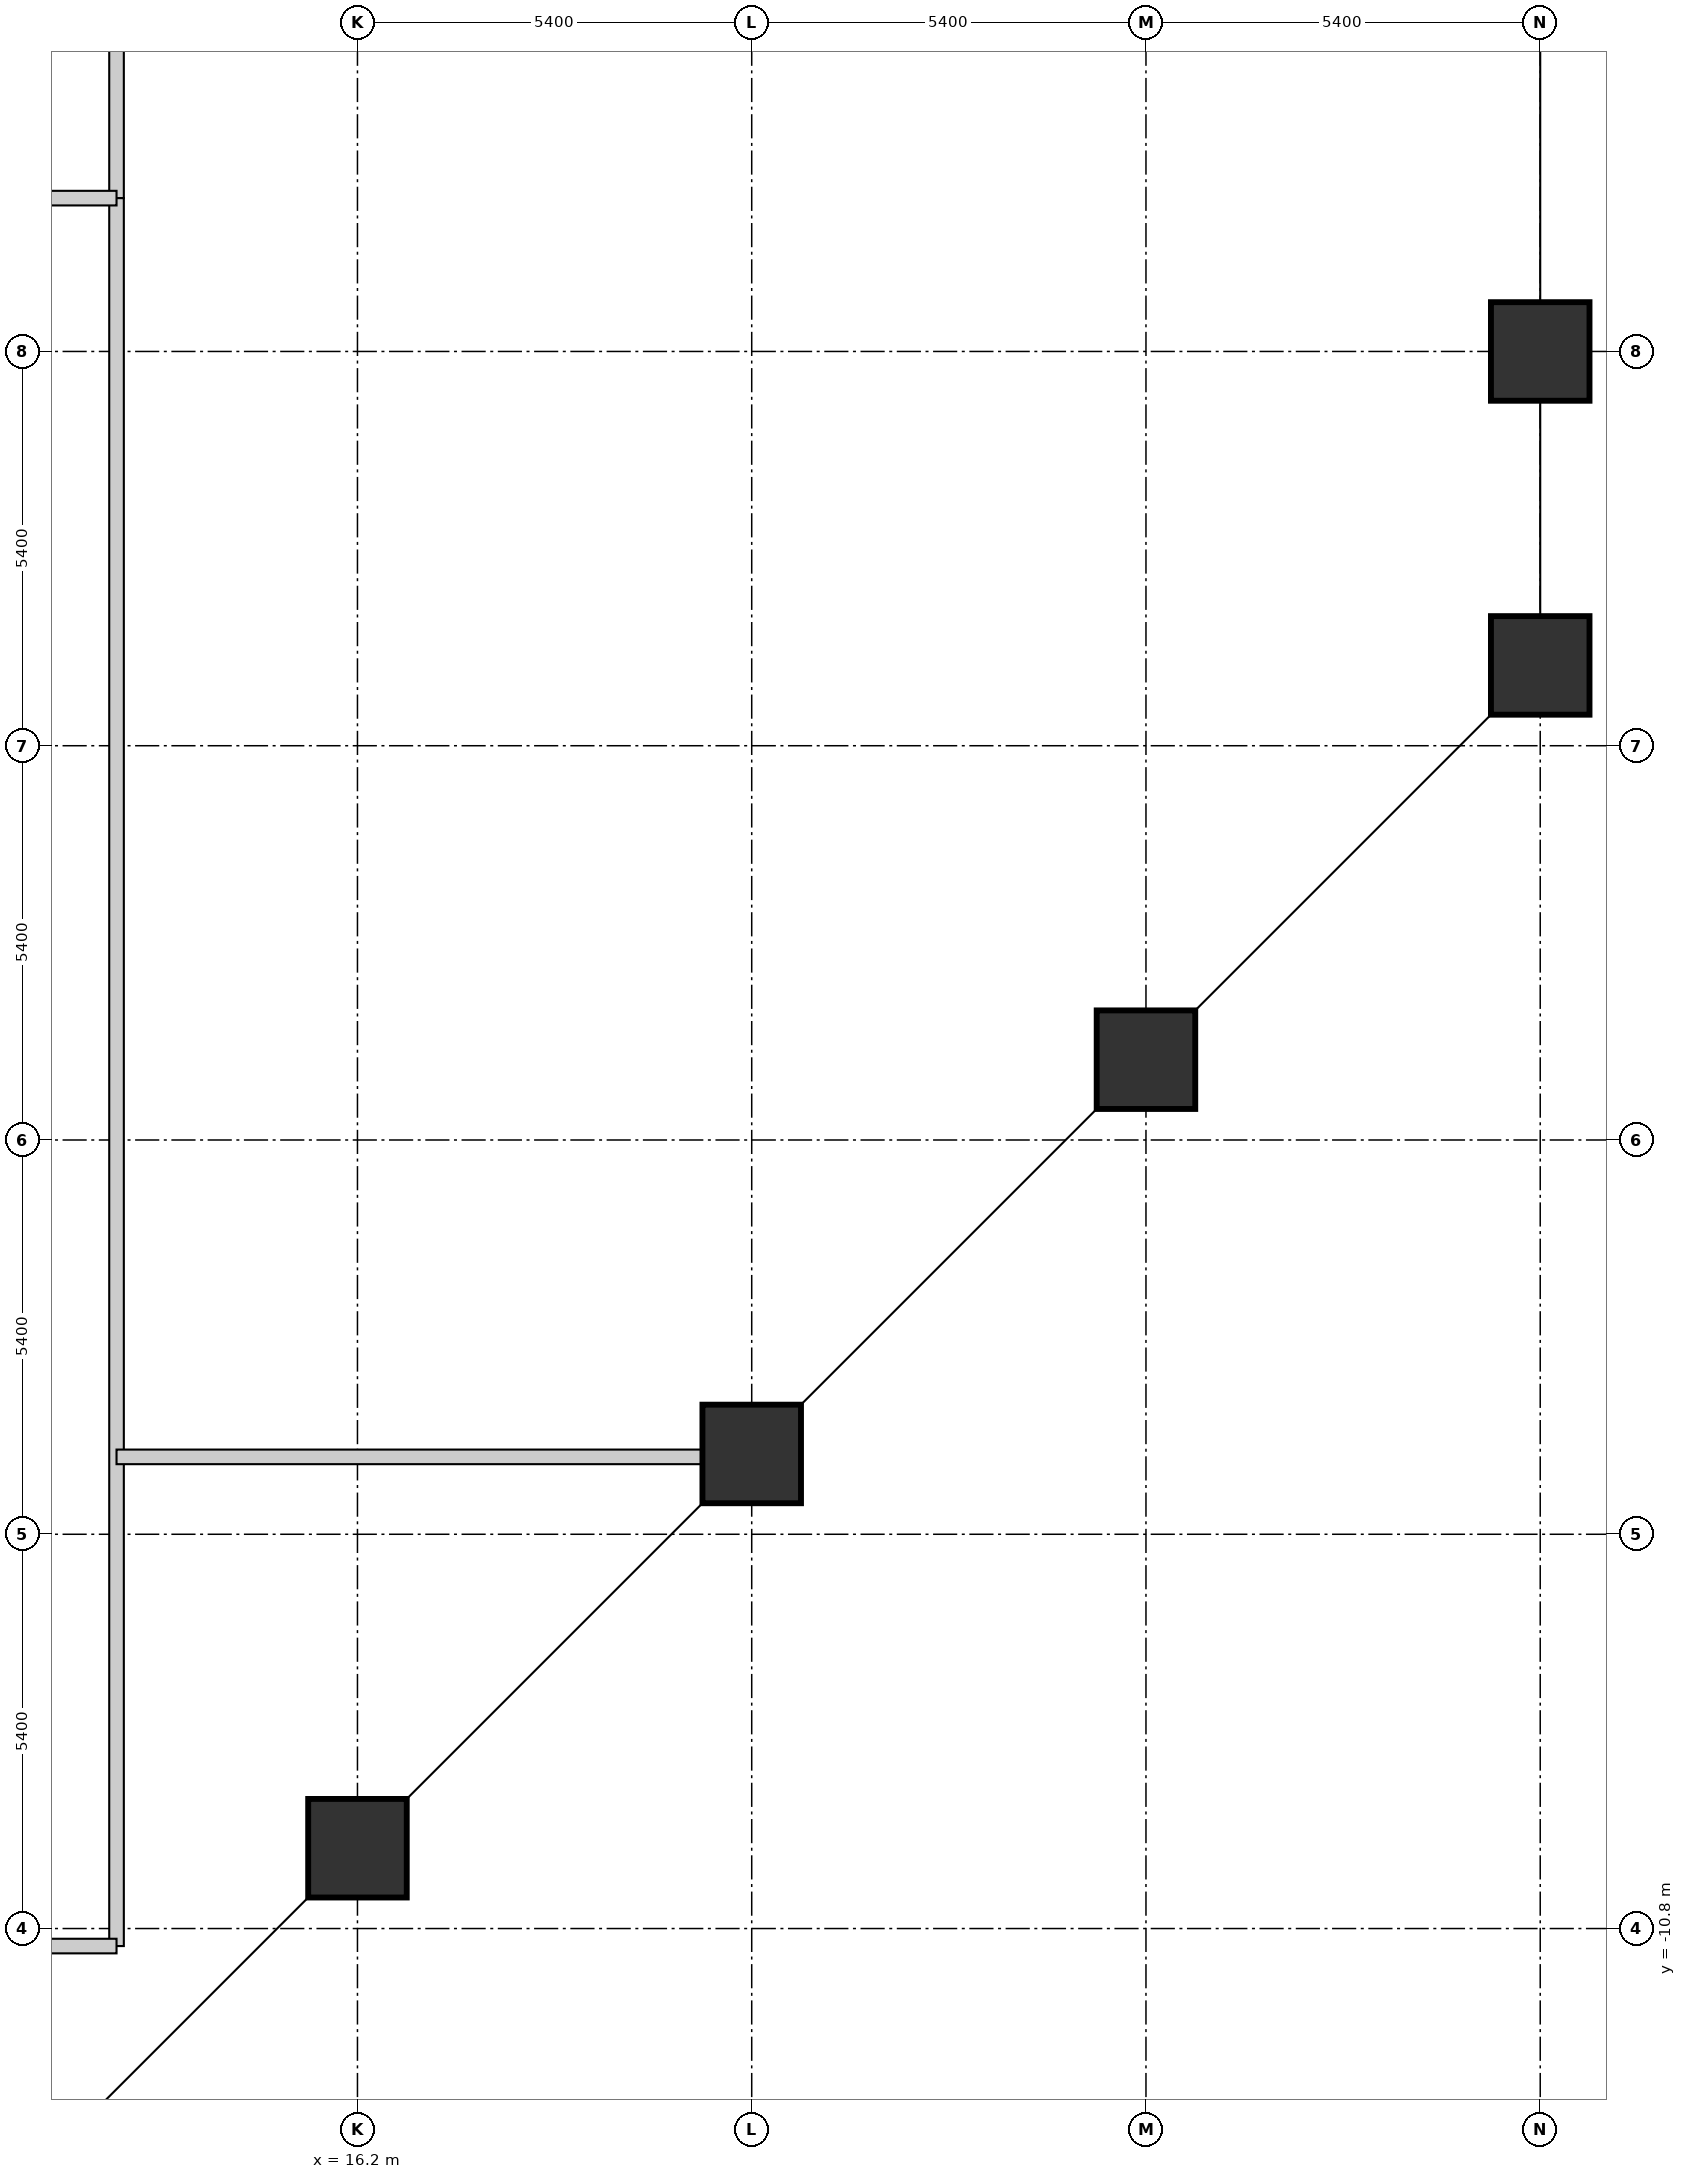
"""IFC4 building model, lengths in metres.
Left out: names, types, materials, properties, quantities, classifications, styles, units other than length and angle.
Written with IfcOpenShell. Run it as: python <this file> out.ifc"""

import sys

from ifc_helpers import new_model, si_unit, direction, frame, frame_2d, origin, origin_2d, place, context, subcontext, project, spatial, rectangle, extrude, element, fill, save


model = new_model("IFC4")
c1 = context("Model", 3, precision=1e-05, world=origin(), true_north=direction((0.0, 1.0)))
c2 = subcontext(c1, "Body", "Model", "MODEL_VIEW")
j1 = project(units=[si_unit("LENGTHUNIT", "METRE"), si_unit("PLANEANGLEUNIT", "RADIAN")], contexts=[c1])
p1 = place(None, origin())
s1 = spatial("IfcSite", under=j1, at=p1, CompositionType="ELEMENT")
p2 = place(p1, origin())
s2 = spatial("IfcBuilding", under=s1, at=p2, CompositionType="ELEMENT")
p3 = place(p2, frame((0.0, 0.0, 22.5)))
s3 = spatial("IfcBuildingStorey", under=s2, at=p3, CompositionType="ELEMENT", Elevation=22.5)
for number, where, z_axis, x_axis in (
    (1, (16.2, -9.7, 0.0), (0.0, 0.0, 1.0), (1.0, 0.0, 0.0)),
    (2, (21.6, -4.3, 0.0), (0.0, 0.0, 1.0), (1.0, 0.0, 0.0)),
    (3, (27.0, 1.1, 0.0), (0.0, 0.0, 1.0), (1.0, 0.0, 0.0)),
    (4, (32.4, 6.5, 0.0), (0.0, 0.0, 1.0), (1.0, 0.0, 0.0)),
    (5, (32.4, 10.8, 0.0), (0.0, 0.0, 1.0), (1.0, 0.0, 0.0)),
):
    element("IfcColumn", number, at=place(p3, frame(where, z_axis=z_axis, x_axis=x_axis)), inside=s3, PredefinedType="COLUMN", context=c2, shape_type="SweptSolid", body=[
        extrude(rectangle(XDim=1.35, YDim=1.35, at=origin_2d()), origin(), (0.0, 0.0, 1.0), 3.75),
    ])
p4 = place(p3, frame((12.9, 12.9, 0.0), z_axis=(0.0, 0.0, 1.0), x_axis=(0.0, 1.0, 0.0)))
e6 = element("IfcWall", 6, at=p4, inside=s3, PredefinedType="PARTITIONING", context=c2, shape_type="SweptSolid", body=[
    extrude(rectangle(XDim=12.94, YDim=0.2, at=frame_2d((6.47, 0.0))), origin(), (0.0, 0.0, 1.0), 2.629),
])
p5 = place(p3, frame((12.9, -11.04, 0.0), z_axis=(0.0, 0.0, 1.0), x_axis=(0.0, 1.0, 0.0)))
e7 = element("IfcWall", 7, at=p5, inside=s3, PredefinedType="PARTITIONING", context=c2, shape_type="SweptSolid", body=[
    extrude(rectangle(XDim=23.94, YDim=0.2, at=frame_2d((11.97, 0.0))), origin(), (0.0, 0.0, 1.0), 3.57),
])
p6 = place(p5, frame((2.9, 0.0, 0.0)))
e8 = element("IfcOpeningElement", 8, at=p6, cuts=e7, PredefinedType="OPENING", context=c2, shape_type="SweptSolid", body=[
    extrude(rectangle(XDim=0.85, YDim=2.1, at=frame_2d((0.425, 1.05))), frame((0.0, 0.11, 0.0), z_axis=(0.0, -1.0, 0.0), x_axis=(1.0, 0.0, 0.0)), (0.0, 0.0, 1.0), 0.22),
])
p7 = place(p5, frame((14.87, 0.0, 0.0)))
e9 = element("IfcOpeningElement", 9, at=p7, cuts=e7, PredefinedType="OPENING", context=c2, shape_type="SweptSolid", body=[
    extrude(rectangle(XDim=0.95, YDim=2.1, at=frame_2d((0.475, 1.05))), frame((0.0, 0.11, 0.0), z_axis=(0.0, -1.0, 0.0), x_axis=(1.0, 0.0, 0.0)), (0.0, 0.0, 1.0), 0.22),
])
p8 = place(p3, frame((10.85, -11.04, 0.0), z_axis=(0.0, 0.0, 1.0), x_axis=(1.0, 0.0, 0.0)))
e10 = element("IfcWall", 10, at=p8, inside=s3, PredefinedType="PARTITIONING", context=c2, shape_type="SweptSolid", body=[
    extrude(rectangle(XDim=2.05, YDim=0.2, at=frame_2d((1.025, 0.0))), origin(), (0.0, 0.0, 1.0), 3.57),
])
p9 = place(p3, frame((-12.9, 12.9, 0.0), z_axis=(0.0, 0.0, 1.0), x_axis=(1.0, 0.0, 0.0)))
e11 = element("IfcWall", 11, at=p9, inside=s3, PredefinedType="PARTITIONING", context=c2, shape_type="SweptSolid", body=[
    extrude(rectangle(XDim=25.8, YDim=0.2, at=frame_2d((12.9, 0.0))), origin(), (0.0, 0.0, 1.0), 2.93),
])
p10 = place(p9, frame((4.347, 0.0, 0.0)))
e12 = element("IfcOpeningElement", 12, at=p10, cuts=e11, PredefinedType="OPENING", context=c2, shape_type="SweptSolid", body=[
    extrude(rectangle(XDim=0.85, YDim=2.1, at=frame_2d((0.425, 1.05))), frame((0.0, 0.11, 0.0), z_axis=(0.0, -1.0, 0.0), x_axis=(1.0, 0.0, 0.0)), (0.0, 0.0, 1.0), 0.22),
])
p11 = place(p9, frame((9.1, 0.0, 0.0)))
e13 = element("IfcOpeningElement", 13, at=p11, cuts=e11, PredefinedType="OPENING", context=c2, shape_type="SweptSolid", body=[
    extrude(rectangle(XDim=0.85, YDim=2.1, at=frame_2d((0.425, 1.05))), frame((0.0, 0.11, 0.0), z_axis=(0.0, -1.0, 0.0), x_axis=(1.0, 0.0, 0.0)), (0.0, 0.0, 1.0), 0.22),
])
p12 = place(p9, frame((19.16, 0.0, 0.0)))
e14 = element("IfcOpeningElement", 14, at=p12, cuts=e11, PredefinedType="OPENING", context=c2, shape_type="SweptSolid", body=[
    extrude(rectangle(XDim=0.95, YDim=2.1, at=frame_2d((0.475, 1.05))), frame((0.0, 0.11, 0.0), z_axis=(0.0, -1.0, 0.0), x_axis=(1.0, 0.0, 0.0)), (0.0, 0.0, 1.0), 0.22),
])
p13 = place(p3, frame((12.9, -4.34, 0.0), z_axis=(0.0, 0.0, 1.0), x_axis=(1.0, 0.0, 0.0)))
e15 = element("IfcWall", 15, at=p13, inside=s3, PredefinedType="PARTITIONING", context=c2, shape_type="SweptSolid", body=[
    extrude(rectangle(XDim=8.575, YDim=0.2, at=frame_2d((4.288, 0.0))), origin(), (0.0, 0.0, 1.0), 2.629),
])
p14 = place(p6, origin())
e16 = element("IfcDoor", 16, at=p14, inside=s3, OperationType="SINGLE_SWING_LEFT", PredefinedType="DOOR", context=c2, shape_type="SweptSolid", body=[
    extrude(rectangle(XDim=0.85, YDim=2.1, at=frame_2d((0.425, 1.05))), frame((0.0, 0.025, 0.0), z_axis=(0.0, -1.0, 0.0), x_axis=(1.0, 0.0, 0.0)), (0.0, 0.0, 1.0), 0.05),
])
fill(e8, e16)
p15 = place(p7, origin())
e17 = element("IfcDoor", 17, at=p15, inside=s3, OperationType="SINGLE_SWING_RIGHT", PredefinedType="DOOR", context=c2, shape_type="SweptSolid", body=[
    extrude(rectangle(XDim=0.95, YDim=2.1, at=frame_2d((0.475, 1.05))), frame((0.0, 0.025, 0.0), z_axis=(0.0, -1.0, 0.0), x_axis=(1.0, 0.0, 0.0)), (0.0, 0.0, 1.0), 0.05),
])
fill(e9, e17)
save(model, sys.argv[1])
